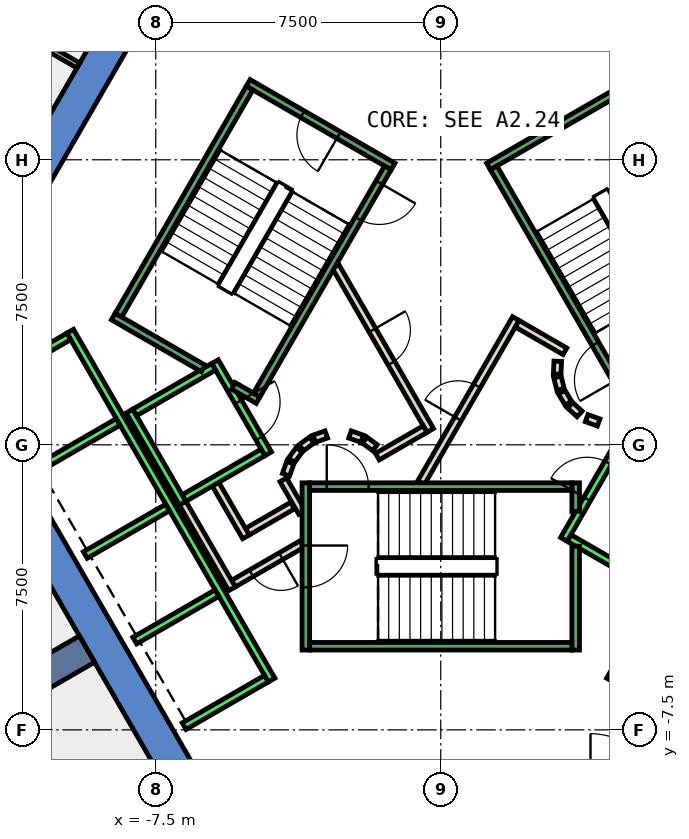
"""IFC4 building model, lengths in metres.
Left out: names, types, materials, properties, quantities, classifications, styles, units other than length and angle.
Written with IfcOpenShell. Run it as: python <this file> out.ifc"""

import sys

from ifc_helpers import new_model, si_unit, direction, frame, frame_2d, origin, place, context, subcontext, project, spatial, polyline, rectangle, outline, extrude, element, fill, save


model = new_model("IFC4")
c1 = context("Model", 3, precision=1e-05, world=origin(), true_north=direction((0.0, 1.0)))
c2 = subcontext(c1, "Body", "Model", "MODEL_VIEW")
j1 = project(units=[si_unit("LENGTHUNIT", "METRE"), si_unit("PLANEANGLEUNIT", "RADIAN")], contexts=[c1])
p1 = place(None, origin())
s1 = spatial("IfcSite", under=j1, at=p1, CompositionType="ELEMENT")
p2 = place(p1, origin())
s2 = spatial("IfcBuilding", under=s1, at=p2, CompositionType="ELEMENT")
p3 = place(p2, frame((0.0, 0.0, 116.0)))
s3 = spatial("IfcBuildingStorey", under=s2, at=p3, CompositionType="ELEMENT", Elevation=116.0)
p4 = place(p3, frame((0.0, 0.0, -0.4)))
e1 = element("IfcWall", 1, at=p4, inside=s3, PredefinedType="SHEAR", context=c2, shape_type="SweptSolid", body=[
    extrude(outline(polyline([(-12.267, 5.252), (-11.488, 4.802), (-6.409, 13.6), (-6.928, 14.5), (-12.267, 5.252)])), origin(), (0.0, 0.0, 1.0), 4.2),
])
p5 = place(p3, frame((0.0, 0.0, -0.4)))
e2 = element("IfcWall", 2, at=p5, inside=s3, PredefinedType="SHEAR", context=c2, shape_type="SweptSolid", body=[
    extrude(outline(polyline([(-13.856, 2.5), (-6.928, -9.5), (-6.409, -8.6), (-12.817, 2.5), (-13.856, 2.5)])), origin(), (0.0, 0.0, 1.0), 4.2),
])
p6 = place(p3, frame((-9.31, -5.375, -0.4), z_axis=(0.0, 0.0, 1.0), x_axis=(-0.866017533419, -0.500013631625, 0.0)))
e3 = element("IfcWall", 3, at=p6, inside=s3, PredefinedType="SHEAR", context=c2, shape_type="SweptSolid", body=[
    extrude(rectangle(XDim=9.0, YDim=0.8, at=frame_2d((4.5, 0.0))), origin(), (0.0, 0.0, 1.0), 4.2),
])
p7 = place(p3, frame((-3.9, -1.599, 0.0), z_axis=(0.0, 0.0, 1.0), x_axis=(-0.865969445389, -0.500096910261, 0.0)))
e4 = element("IfcWall", 4, at=p7, inside=s3, PredefinedType="PARTITIONING", context=c2, shape_type="SweptSolid", body=[
    extrude(rectangle(XDim=1.373, YDim=0.2, at=frame_2d((0.687, 0.0))), origin(), (0.0, 0.0, 1.0), 3.8),
])
p8 = place(p3, frame((-5.126, -2.422, 0.0), z_axis=(0.0, 0.0, 1.0), x_axis=(-0.500062241894, 0.865989465428, 0.0)))
e5 = element("IfcWall", 5, at=p8, inside=s3, PredefinedType="PARTITIONING", context=c2, shape_type="SweptSolid", body=[
    extrude(rectangle(XDim=1.7, YDim=0.2, at=frame_2d((0.85, 0.0))), origin(), (0.0, 0.0, 1.0), 3.8),
])
p9 = place(p3, frame((-3.65, -2.61, 0.0), z_axis=(0.0, 0.0, 1.0), x_axis=(-0.866072462134, -0.499918483688, 0.0)))
e6 = element("IfcWall", 6, at=p9, inside=s3, PredefinedType="PARTITIONING", context=c2, shape_type="SweptSolid", body=[
    extrude(rectangle(XDim=2.084, YDim=0.2, at=frame_2d((1.042, 0.0))), origin(), (0.0, 0.0, 1.0), 3.8),
])
p10 = place(p9, frame((0.642, 0.0, 0.0)))
e7 = element("IfcOpeningElement", 7, at=p10, cuts=e6, PredefinedType="OPENING", context=c2, shape_type="SweptSolid", body=[
    extrude(rectangle(XDim=0.9, YDim=2.1, at=frame_2d((0.45, 1.05))), frame((0.0, 0.11, 0.0), z_axis=(0.0, -1.0, 0.0), x_axis=(1.0, 0.0, 0.0)), (0.0, 0.0, 1.0), 0.22),
])
p11 = place(p3, frame((-5.492, -3.788, 0.0), z_axis=(0.0, 0.0, 1.0), x_axis=(-0.500008949224, 0.866020236886, 0.0)))
e8 = element("IfcWall", 8, at=p11, inside=s3, PredefinedType="PARTITIONING", context=c2, shape_type="SweptSolid", body=[
    extrude(rectangle(XDim=2.68, YDim=0.2, at=frame_2d((1.34, 0.0))), origin(), (0.0, 0.0, 1.0), 3.8),
])
p12 = place(p3, frame((-4.145, -0.92, 0.0), z_axis=(0.0, 0.0, 1.0), x_axis=(0.499743786207, -0.866173278362, 0.0)))
e9 = element("IfcWall", 9, at=p12, inside=s3, PredefinedType="PARTITIONING", context=c2, shape_type="SweptSolid", body=[
    extrude(rectangle(XDim=0.991, YDim=0.2, at=frame_2d((0.495, 0.0))), origin(), (0.0, 0.0, 1.0), 3.8),
])
p13 = place(p3, frame((-9.537, 9.981, 0.0), z_axis=(0.0, 0.0, 1.0), x_axis=(-0.866068787954, 0.499924848885, 0.0)))
e10 = element("IfcWall", 10, at=p13, inside=s3, PredefinedType="PARTITIONING", context=c2, shape_type="SweptSolid", body=[
    extrude(rectangle(XDim=3.829, YDim=0.15, at=frame_2d((1.914, 0.0))), origin(), (0.0, 0.0, 1.0), 3.8),
])
p14 = place(p3, frame((-0.52, -1.0, 0.0), z_axis=(0.0, 0.0, 1.0), x_axis=(0.50011622646, 0.865958290007, 0.0)))
e11 = element("IfcWall", 11, at=p14, inside=s3, PredefinedType="PARTITIONING", context=c2, shape_type="SweptSolid", body=[
    extrude(rectangle(XDim=4.991, YDim=0.2, at=frame_2d((2.496, 0.0))), origin(), (0.0, 0.0, 1.0), 3.8),
])
p15 = place(p14, frame((1.945, 0.0, 0.0)))
e12 = element("IfcOpeningElement", 12, at=p15, cuts=e11, PredefinedType="OPENING", context=c2, shape_type="SweptSolid", body=[
    extrude(rectangle(XDim=1.0, YDim=2.1, at=frame_2d((0.5, 1.05))), frame((0.0, 0.11, 0.0), z_axis=(0.0, -1.0, 0.0), x_axis=(1.0, 0.0, 0.0)), (0.0, 0.0, 1.0), 0.22),
])
p16 = place(p3, frame((2.012, 3.186, 0.0), z_axis=(0.0, 0.0, 1.0), x_axis=(0.865891012941, -0.500232699559, 0.0)))
e13 = element("IfcWall", 13, at=p16, inside=s3, PredefinedType="PARTITIONING", context=c2, shape_type="SweptSolid", body=[
    extrude(rectangle(XDim=1.449, YDim=0.2, at=frame_2d((0.725, 0.0))), origin(), (0.0, 0.0, 1.0), 3.8),
])
p17 = place(p3, frame((3.079, 2.199, 0.0), z_axis=(0.0, 0.0, 1.0), x_axis=(-0.047771483479, -0.998858290933, 0.0)))
e14 = element("IfcWall", 14, at=p17, inside=s3, PredefinedType="PARTITIONING", context=c2, shape_type="SweptSolid", body=[
    extrude(rectangle(XDim=0.337, YDim=0.2, at=frame_2d((0.169, 0.0))), origin(), (0.0, 0.0, 1.0), 3.8),
])
p18 = place(p3, frame((3.07, 1.786, 0.0), z_axis=(0.0, 0.0, 1.0), x_axis=(0.242705583207, -0.970099994784, 0.0)))
e15 = element("IfcWall", 15, at=p18, inside=s3, PredefinedType="PARTITIONING", context=c2, shape_type="SweptSolid", body=[
    extrude(rectangle(XDim=0.338, YDim=0.2, at=frame_2d((0.169, 0.0))), origin(), (0.0, 0.0, 1.0), 3.8),
])
for number, where, z_axis, x_axis in (
    (16, (3.182, 1.388, 0.0), (0.0, 0.0, 1.0), (0.512, -0.859, 0.0)),
    (17, (3.404, 1.039, 0.0), (0.0, 0.0, 1.0), (0.74, -0.672, 0.0)),
):
    element("IfcWall", number, at=place(p3, frame(where, z_axis=z_axis, x_axis=x_axis)), inside=s3, PredefinedType="PARTITIONING", context=c2, shape_type="SweptSolid", body=[
        extrude(rectangle(XDim=0.338, YDim=0.2, at=frame_2d((0.169, 0.0))), origin(), (0.0, 0.0, 1.0), 3.8),
    ])
p19 = place(p3, frame((3.838, 0.702, 0.0), z_axis=(0.0, 0.0, 1.0), x_axis=(0.941035081519, -0.338308993895, 0.0)))
e18 = element("IfcWall", 18, at=p19, inside=s3, PredefinedType="PARTITIONING", context=c2, shape_type="SweptSolid", body=[
    extrude(rectangle(XDim=0.337, YDim=0.2, at=frame_2d((0.168, 0.0))), origin(), (0.0, 0.0, 1.0), 3.8),
])
p20 = place(p3, frame((-2.771, 4.7, 0.0), z_axis=(0.0, 0.0, 1.0), x_axis=(0.499969479948, -0.866043023828, 0.0)))
e19 = element("IfcWall", 19, at=p20, inside=s3, PredefinedType="PARTITIONING", context=c2, shape_type="SweptSolid", body=[
    extrude(rectangle(XDim=4.99, YDim=0.2, at=frame_2d((2.495, 0.0))), origin(), (0.0, 0.0, 1.0), 3.8),
])
p21 = place(p20, frame((1.945, 0.0, 0.0)))
e20 = element("IfcOpeningElement", 20, at=p21, cuts=e19, PredefinedType="OPENING", context=c2, shape_type="SweptSolid", body=[
    extrude(rectangle(XDim=1.0, YDim=2.1, at=frame_2d((0.5, 1.05))), frame((0.0, 0.11, 0.0), z_axis=(0.0, -1.0, 0.0), x_axis=(1.0, 0.0, 0.0)), (0.0, 0.0, 1.0), 0.22),
])
p22 = place(p3, frame((-0.412, 0.414, 0.0), z_axis=(0.0, 0.0, 1.0), x_axis=(-0.866017369001, -0.500013916395, 0.0)))
e21 = element("IfcWall", 21, at=p22, inside=s3, PredefinedType="PARTITIONING", context=c2, shape_type="SweptSolid", body=[
    extrude(rectangle(XDim=1.45, YDim=0.2, at=frame_2d((0.725, 0.0))), origin(), (0.0, 0.0, 1.0), 3.8),
])
p23 = place(p3, frame((-1.731, -0.077, 0.0), z_axis=(0.0, 0.0, 1.0), x_axis=(-0.804311165252, 0.594208338422, 0.0)))
e22 = element("IfcWall", 22, at=p23, inside=s3, PredefinedType="PARTITIONING", context=c2, shape_type="SweptSolid", body=[
    extrude(rectangle(XDim=0.338, YDim=0.2, at=frame_2d((0.169, 0.0))), origin(), (0.0, 0.0, 1.0), 3.8),
])
p24 = place(p3, frame((-2.07, 0.16, 0.0), z_axis=(0.0, 0.0, 1.0), x_axis=(-0.942199461132, 0.335052496547, 0.0)))
e23 = element("IfcWall", 23, at=p24, inside=s3, PredefinedType="PARTITIONING", context=c2, shape_type="SweptSolid", body=[
    extrude(rectangle(XDim=0.337, YDim=0.2, at=frame_2d((0.169, 0.0))), origin(), (0.0, 0.0, 1.0), 3.8),
])
p25 = place(p3, frame((-3.012, 0.273, 0.0), z_axis=(0.0, 0.0, 1.0), x_axis=(-0.942280615813, -0.334824194261, 0.0)))
e24 = element("IfcWall", 24, at=p25, inside=s3, PredefinedType="PARTITIONING", context=c2, shape_type="SweptSolid", body=[
    extrude(rectangle(XDim=0.338, YDim=0.2, at=frame_2d((0.169, 0.0))), origin(), (0.0, 0.0, 1.0), 3.8),
])
p26 = place(p3, frame((-3.397, 0.124, 0.0), z_axis=(0.0, 0.0, 1.0), x_axis=(-0.804311165252, -0.594208338422, 0.0)))
e25 = element("IfcWall", 25, at=p26, inside=s3, PredefinedType="PARTITIONING", context=c2, shape_type="SweptSolid", body=[
    extrude(rectangle(XDim=0.338, YDim=0.2, at=frame_2d((0.169, 0.0))), origin(), (0.0, 0.0, 1.0), 3.8),
])
p27 = place(p3, frame((-3.723, -0.131, 0.0), z_axis=(0.0, 0.0, 1.0), x_axis=(-0.594675113454, -0.803966112121, 0.0)))
e26 = element("IfcWall", 26, at=p27, inside=s3, PredefinedType="PARTITIONING", context=c2, shape_type="SweptSolid", body=[
    extrude(rectangle(XDim=0.338, YDim=0.2, at=frame_2d((0.169, 0.0))), origin(), (0.0, 0.0, 1.0), 3.8),
])
p28 = place(p3, frame((-3.96, -0.47, 0.0), z_axis=(0.0, 0.0, 1.0), x_axis=(-0.334824194261, -0.942280615813, 0.0)))
e27 = element("IfcWall", 27, at=p28, inside=s3, PredefinedType="PARTITIONING", context=c2, shape_type="SweptSolid", body=[
    extrude(rectangle(XDim=0.338, YDim=0.2, at=frame_2d((0.169, 0.0))), origin(), (0.0, 0.0, 1.0), 3.8),
])
p29 = place(p3, frame((-5.94, 2.188, 0.0), z_axis=(0.0, 0.0, 1.0), x_axis=(0.49994636267, -0.866056369097, 0.0)))
e28 = element("IfcWall", 28, at=p29, inside=s3, PredefinedType="STANDARD", context=c2, shape_type="SweptSolid", body=[
    extrude(rectangle(XDim=2.8, YDim=0.2, at=frame_2d((1.4, 0.0))), origin(), (0.0, 0.0, 1.0), 3.8),
])
p30 = place(p29, frame((1.225, 0.0, 0.0)))
e29 = element("IfcOpeningElement", 29, at=p30, cuts=e28, PredefinedType="OPENING", context=c2, shape_type="SweptSolid", body=[
    extrude(rectangle(XDim=1.1, YDim=2.1, at=frame_2d((0.55, 1.05))), frame((0.0, 0.11, 0.0), z_axis=(0.0, -1.0, 0.0), x_axis=(1.0, 0.0, 0.0)), (0.0, 0.0, 1.0), 0.22),
])
p31 = place(p3, frame((-8.192, 0.888, 0.0), z_axis=(0.0, 0.0, 1.0), x_axis=(0.49994636267, -0.866056369097, 0.0)))
e30 = element("IfcWall", 30, at=p31, inside=s3, PredefinedType="STANDARD", context=c2, shape_type="SweptSolid", body=[
    extrude(rectangle(XDim=2.8, YDim=0.2, at=frame_2d((1.4, 0.0))), origin(), (0.0, 0.0, 1.0), 3.8),
])
for number, where, z_axis, x_axis in (
    (31, (-5.977, 2.052, 0.0), (0.0, 0.0, 1.0), (-0.866, -0.5, 0.0)),
    (32, (-4.677, -0.2, 0.0), (0.0, 0.0, 1.0), (-0.866, -0.5, 0.0)),
):
    element("IfcWall", number, at=place(p3, frame(where, z_axis=z_axis, x_axis=x_axis)), inside=s3, PredefinedType="STANDARD", context=c2, shape_type="SweptSolid", body=[
        extrude(rectangle(XDim=2.399, YDim=0.2, at=frame_2d((1.2, 0.0))), origin(), (0.0, 0.0, 1.0), 3.8),
    ])
p32 = place(p3, frame((-9.751, 2.99, 0.0), z_axis=(0.0, 0.0, 1.0), x_axis=(0.50000090737, -0.866024879913, 0.0)))
e33 = element("IfcWall", 33, at=p32, inside=s3, PredefinedType="STANDARD", context=c2, shape_type="SweptSolid", body=[
    extrude(rectangle(XDim=10.6, YDim=0.2, at=frame_2d((5.3, 0.0))), origin(), (0.0, 0.0, 1.0), 3.8),
])
p33 = place(p3, frame((-9.788, 2.853, 0.0), z_axis=(0.0, 0.0, 1.0), x_axis=(-0.865998541277, -0.500046524342, 0.0)))
e34 = element("IfcWall", 34, at=p33, inside=s3, PredefinedType="STANDARD", context=c2, shape_type="SweptSolid", body=[
    extrude(rectangle(XDim=2.5, YDim=0.2, at=frame_2d((1.25, 0.0))), origin(), (0.0, 0.0, 1.0), 3.8),
])
for number, where, z_axis, x_axis in (
    (35, (-8.488, 0.602, 0.0), (0.0, 0.0, 1.0), (-0.866, -0.5, 0.0)),
    (36, (-7.188, -1.65, 0.0), (0.0, 0.0, 1.0), (-0.866, -0.5, 0.0)),
    (37, (-5.888, -3.902, 0.0), (0.0, 0.0, 1.0), (-0.866, -0.5, 0.0)),
    (38, (-4.588, -6.153, 0.0), (0.0, 0.0, 1.0), (-0.866, -0.5, 0.0)),
):
    element("IfcWall", number, at=place(p3, frame(where, z_axis=z_axis, x_axis=x_axis)), inside=s3, PredefinedType="STANDARD", context=c2, shape_type="SweptSolid", body=[
        extrude(rectangle(XDim=2.5, YDim=0.2, at=frame_2d((1.25, 0.0))), origin(), (0.0, 0.0, 1.0), 3.8),
    ])
p34 = place(p3, frame((3.24, -2.488, 0.0), z_axis=(0.0, 0.0, 1.0), x_axis=(0.49994636267, 0.866056369097, 0.0)))
e39 = element("IfcWall", 39, at=p34, inside=s3, PredefinedType="STANDARD", context=c2, shape_type="SweptSolid", body=[
    extrude(rectangle(XDim=2.8, YDim=0.2, at=frame_2d((1.4, 0.0))), origin(), (0.0, 0.0, 1.0), 3.8),
])
p35 = place(p34, frame((1.225, 0.0, 0.0)))
e40 = element("IfcOpeningElement", 40, at=p35, cuts=e39, PredefinedType="OPENING", context=c2, shape_type="SweptSolid", body=[
    extrude(rectangle(XDim=1.1, YDim=2.1, at=frame_2d((0.55, 1.05))), frame((0.0, 0.11, 0.0), z_axis=(0.0, -1.0, 0.0), x_axis=(1.0, 0.0, 0.0)), (0.0, 0.0, 1.0), 0.22),
])
p36 = place(p3, frame((3.377, -2.452, 0.0), z_axis=(0.0, 0.0, 1.0), x_axis=(0.865955154139, -0.50012165622, 0.0)))
e41 = element("IfcWall", 41, at=p36, inside=s3, PredefinedType="STANDARD", context=c2, shape_type="SweptSolid", body=[
    extrude(rectangle(XDim=2.4, YDim=0.2, at=frame_2d((1.2, 0.0))), origin(), (0.0, 0.0, 1.0), 3.8),
])
p37 = place(p3, frame((4.451, -6.19, 0.0), z_axis=(0.0, 0.0, 1.0), x_axis=(0.50000090737, 0.866024879913, 0.0)))
e42 = element("IfcWall", 42, at=p37, inside=s3, PredefinedType="STANDARD", context=c2, shape_type="SweptSolid", body=[
    extrude(rectangle(XDim=10.6, YDim=0.2, at=frame_2d((5.3, 0.0))), origin(), (0.0, 0.0, 1.0), 3.8),
])
p38 = place(p3, frame((-3.55, -1.0, 0.0), z_axis=(0.0, 0.0, 1.0), x_axis=(0.0, -1.0, 0.0)))
e43 = element("IfcWall", 43, at=p38, inside=s3, PredefinedType="STANDARD", context=c2, shape_type="SweptSolid", body=[
    extrude(rectangle(XDim=4.4, YDim=0.2, at=frame_2d((2.2, 0.0))), origin(), (0.0, 0.0, 1.0), 3.8),
])
p39 = place(p38, frame((1.65, 0.0, 0.0)))
e44 = element("IfcOpeningElement", 44, at=p39, cuts=e43, PredefinedType="OPENING", context=c2, shape_type="SweptSolid", body=[
    extrude(rectangle(XDim=1.1, YDim=2.2, at=frame_2d((0.55, 1.1))), frame((0.0, 0.11, 0.0), z_axis=(0.0, -1.0, 0.0), x_axis=(1.0, 0.0, 0.0)), (0.0, 0.0, 1.0), 0.22),
])
p40 = place(p3, frame((3.55, -2.667, 0.0), z_axis=(0.0, 0.0, 1.0), x_axis=(0.0, -1.0, 0.0)))
e45 = element("IfcWall", 45, at=p40, inside=s3, PredefinedType="STANDARD", context=c2, shape_type="SweptSolid", body=[
    extrude(rectangle(XDim=2.733, YDim=0.2, at=frame_2d((1.366, 0.0))), origin(), (0.0, 0.0, 1.0), 3.8),
])
p41 = place(p3, frame((3.55, -1.0, 0.0), z_axis=(0.0, 0.0, 1.0), x_axis=(0.0, -1.0, 0.0)))
e46 = element("IfcWall", 46, at=p41, inside=s3, PredefinedType="STANDARD", context=c2, shape_type="SweptSolid", body=[
    extrude(rectangle(XDim=0.751, YDim=0.2, at=frame_2d((0.375, 0.0))), origin(), (0.0, 0.0, 1.0), 3.8),
])
p42 = place(p3, frame((-3.45, -1.1, 0.0), z_axis=(0.0, 0.0, 1.0), x_axis=(1.0, 0.0, 0.0)))
e47 = element("IfcWall", 47, at=p42, inside=s3, PredefinedType="STANDARD", context=c2, shape_type="SweptSolid", body=[
    extrude(rectangle(XDim=6.9, YDim=0.2, at=frame_2d((3.45, 0.0))), origin(), (0.0, 0.0, 1.0), 3.8),
])
p43 = place(p42, frame((0.45, 0.0, 0.0)))
e48 = element("IfcOpeningElement", 48, at=p43, cuts=e47, PredefinedType="OPENING", context=c2, shape_type="SweptSolid", body=[
    extrude(rectangle(XDim=1.1, YDim=2.2, at=frame_2d((0.55, 1.1))), frame((0.0, 0.11, 0.0), z_axis=(0.0, -1.0, 0.0), x_axis=(1.0, 0.0, 0.0)), (0.0, 0.0, 1.0), 0.22),
])
p44 = place(p3, frame((-3.45, -5.3, 0.0), z_axis=(0.0, 0.0, 1.0), x_axis=(1.0, 0.0, 0.0)))
e49 = element("IfcWall", 49, at=p44, inside=s3, PredefinedType="STANDARD", context=c2, shape_type="SweptSolid", body=[
    extrude(rectangle(XDim=6.9, YDim=0.2, at=frame_2d((3.45, 0.0))), origin(), (0.0, 0.0, 1.0), 3.8),
])
p45 = place(p3, frame((1.256, 7.324, 0.0), z_axis=(0.0, 0.0, 1.0), x_axis=(0.866046073146, 0.499964197906, 0.0)))
e50 = element("IfcWall", 50, at=p45, inside=s3, PredefinedType="STANDARD", context=c2, shape_type="SweptSolid", body=[
    extrude(rectangle(XDim=4.4, YDim=0.2, at=frame_2d((2.2, 0.0))), origin(), (0.0, 0.0, 1.0), 3.8),
])
p46 = place(p3, frame((4.843, 1.312, 0.0), z_axis=(0.0, 0.0, 1.0), x_axis=(-0.499963383562, 0.866046543262, 0.0)))
e51 = element("IfcWall", 51, at=p46, inside=s3, PredefinedType="STANDARD", context=c2, shape_type="SweptSolid", body=[
    extrude(rectangle(XDim=6.9, YDim=0.2, at=frame_2d((3.45, 0.0))), origin(), (0.0, 0.0, 1.0), 3.8),
])
p47 = place(p46, frame((0.45, 0.0, 0.0)))
e52 = element("IfcOpeningElement", 52, at=p47, cuts=e51, PredefinedType="OPENING", context=c2, shape_type="SweptSolid", body=[
    extrude(rectangle(XDim=1.1, YDim=2.2, at=frame_2d((0.55, 1.1))), frame((0.0, 0.11, 0.0), z_axis=(0.0, -1.0, 0.0), x_axis=(1.0, 0.0, 0.0)), (0.0, 0.0, 1.0), 0.22),
])
p48 = place(p3, frame((-1.256, 7.324, 0.0), z_axis=(0.0, 0.0, 1.0), x_axis=(-0.866046073146, 0.499964197906, 0.0)))
e53 = element("IfcWall", 53, at=p48, inside=s3, PredefinedType="STANDARD", context=c2, shape_type="SweptSolid", body=[
    extrude(rectangle(XDim=4.4, YDim=0.2, at=frame_2d((2.2, 0.0))), origin(), (0.0, 0.0, 1.0), 3.8),
])
p49 = place(p48, frame((1.65, 0.0, 0.0)))
e54 = element("IfcOpeningElement", 54, at=p49, cuts=e53, PredefinedType="OPENING", context=c2, shape_type="SweptSolid", body=[
    extrude(rectangle(XDim=1.1, YDim=2.2, at=frame_2d((0.55, 1.1))), frame((0.0, 0.11, 0.0), z_axis=(0.0, -1.0, 0.0), x_axis=(1.0, 0.0, 0.0)), (0.0, 0.0, 1.0), 0.22),
])
p50 = place(p3, frame((-6.25, 2.01, 0.0), z_axis=(0.0, 0.0, 1.0), x_axis=(-0.86611865017, 0.499838457731, 0.0)))
e55 = element("IfcWall", 55, at=p50, inside=s3, PredefinedType="STANDARD", context=c2, shape_type="SweptSolid", body=[
    extrude(rectangle(XDim=2.733, YDim=0.2, at=frame_2d((1.366, 0.0))), origin(), (0.0, 0.0, 1.0), 3.8),
])
p51 = place(p3, frame((-4.806, 1.176, 0.0), z_axis=(0.0, 0.0, 1.0), x_axis=(-0.866558586415, 0.499075361355, 0.0)))
e56 = element("IfcWall", 56, at=p51, inside=s3, PredefinedType="STANDARD", context=c2, shape_type="SweptSolid", body=[
    extrude(rectangle(XDim=0.751, YDim=0.2, at=frame_2d((0.376, 0.0))), origin(), (0.0, 0.0, 1.0), 3.8),
])
p52 = place(p3, frame((-1.393, 7.288, 0.0), z_axis=(0.0, 0.0, 1.0), x_axis=(-0.499963383562, -0.866046543262, 0.0)))
e57 = element("IfcWall", 57, at=p52, inside=s3, PredefinedType="STANDARD", context=c2, shape_type="SweptSolid", body=[
    extrude(rectangle(XDim=6.9, YDim=0.2, at=frame_2d((3.45, 0.0))), origin(), (0.0, 0.0, 1.0), 3.8),
])
p53 = place(p52, frame((0.45, 0.0, 0.0)))
e58 = element("IfcOpeningElement", 58, at=p53, cuts=e57, PredefinedType="OPENING", context=c2, shape_type="SweptSolid", body=[
    extrude(rectangle(XDim=1.1, YDim=2.2, at=frame_2d((0.55, 1.1))), frame((0.0, 0.11, 0.0), z_axis=(0.0, -1.0, 0.0), x_axis=(1.0, 0.0, 0.0)), (0.0, 0.0, 1.0), 0.22),
])
p54 = place(p3, frame((-5.03, 9.388, 0.0), z_axis=(0.0, 0.0, 1.0), x_axis=(-0.499978703459, -0.866037698999, 0.0)))
e59 = element("IfcWall", 59, at=p54, inside=s3, PredefinedType="STANDARD", context=c2, shape_type="SweptSolid", body=[
    extrude(rectangle(XDim=6.9, YDim=0.2, at=frame_2d((3.45, 0.0))), origin(), (0.0, 0.0, 1.0), 3.8),
])
p55 = place(p15, origin())
e60 = element("IfcDoor", 60, at=p55, inside=s3, OperationType="SINGLE_SWING_LEFT", PredefinedType="DOOR", context=c2, shape_type="SweptSolid", body=[
    extrude(rectangle(XDim=1.0, YDim=2.1, at=frame_2d((0.5, 1.05))), frame((0.0, 0.025, 0.0), z_axis=(0.0, -1.0, 0.0), x_axis=(1.0, 0.0, 0.0)), (0.0, 0.0, 1.0), 0.05),
])
fill(e12, e60)
p56 = place(p21, origin())
e61 = element("IfcDoor", 61, at=p56, inside=s3, OperationType="SINGLE_SWING_RIGHT", PredefinedType="DOOR", context=c2, shape_type="SweptSolid", body=[
    extrude(rectangle(XDim=1.0, YDim=2.1, at=frame_2d((0.5, 1.05))), frame((0.0, 0.025, 0.0), z_axis=(0.0, -1.0, 0.0), x_axis=(1.0, 0.0, 0.0)), (0.0, 0.0, 1.0), 0.05),
])
fill(e20, e61)
p57 = place(p10, origin())
e62 = element("IfcDoor", 62, at=p57, inside=s3, OperationType="SINGLE_SWING_LEFT", PredefinedType="DOOR", context=c2, shape_type="SweptSolid", body=[
    extrude(rectangle(XDim=0.9, YDim=2.1, at=frame_2d((0.45, 1.05))), frame((0.0, 0.025, 0.0), z_axis=(0.0, -1.0, 0.0), x_axis=(1.0, 0.0, 0.0)), (0.0, 0.0, 1.0), 0.05),
])
fill(e7, e62)
p58 = place(p35, origin())
e63 = element("IfcDoor", 63, at=p58, inside=s3, OperationType="SLIDING_TO_LEFT", PredefinedType="DOOR", context=c2, shape_type="SweptSolid", body=[
    extrude(rectangle(XDim=1.1, YDim=2.1, at=frame_2d((0.55, 1.05))), frame((0.0, 0.025, 0.0), z_axis=(0.0, -1.0, 0.0), x_axis=(1.0, 0.0, 0.0)), (0.0, 0.0, 1.0), 0.05),
])
fill(e40, e63)
p59 = place(p30, origin())
e64 = element("IfcDoor", 64, at=p59, inside=s3, OperationType="SLIDING_TO_LEFT", PredefinedType="DOOR", context=c2, shape_type="SweptSolid", body=[
    extrude(rectangle(XDim=1.1, YDim=2.1, at=frame_2d((0.55, 1.05))), frame((0.0, 0.025, 0.0), z_axis=(0.0, -1.0, 0.0), x_axis=(1.0, 0.0, 0.0)), (0.0, 0.0, 1.0), 0.05),
])
fill(e29, e64)
p60 = place(p43, origin())
e65 = element("IfcDoor", 65, at=p60, inside=s3, OperationType="SINGLE_SWING_LEFT", PredefinedType="DOOR", context=c2, shape_type="SweptSolid", body=[
    extrude(rectangle(XDim=1.1, YDim=2.2, at=frame_2d((0.55, 1.1))), frame((0.0, 0.025, 0.0), z_axis=(0.0, -1.0, 0.0), x_axis=(1.0, 0.0, 0.0)), (0.0, 0.0, 1.0), 0.05),
])
fill(e48, e65)
p61 = place(p39, origin())
e66 = element("IfcDoor", 66, at=p61, inside=s3, OperationType="SINGLE_SWING_LEFT", PredefinedType="DOOR", context=c2, shape_type="SweptSolid", body=[
    extrude(rectangle(XDim=1.1, YDim=2.2, at=frame_2d((0.55, 1.1))), frame((0.0, 0.025, 0.0), z_axis=(0.0, -1.0, 0.0), x_axis=(1.0, 0.0, 0.0)), (0.0, 0.0, 1.0), 0.05),
])
fill(e44, e66)
p62 = place(p47, origin())
e67 = element("IfcDoor", 67, at=p62, inside=s3, OperationType="SINGLE_SWING_LEFT", PredefinedType="DOOR", context=c2, shape_type="SweptSolid", body=[
    extrude(rectangle(XDim=1.1, YDim=2.2, at=frame_2d((0.55, 1.1))), frame((0.0, 0.025, 0.0), z_axis=(0.0, -1.0, 0.0), x_axis=(1.0, 0.0, 0.0)), (0.0, 0.0, 1.0), 0.05),
])
fill(e52, e67)
p63 = place(p53, origin())
e68 = element("IfcDoor", 68, at=p63, inside=s3, OperationType="SINGLE_SWING_LEFT", PredefinedType="DOOR", context=c2, shape_type="SweptSolid", body=[
    extrude(rectangle(XDim=1.1, YDim=2.2, at=frame_2d((0.55, 1.1))), frame((0.0, 0.025, 0.0), z_axis=(0.0, -1.0, 0.0), x_axis=(1.0, 0.0, 0.0)), (0.0, 0.0, 1.0), 0.05),
])
fill(e58, e68)
p64 = place(p49, origin())
e69 = element("IfcDoor", 69, at=p64, inside=s3, OperationType="SINGLE_SWING_LEFT", PredefinedType="DOOR", context=c2, shape_type="SweptSolid", body=[
    extrude(rectangle(XDim=1.1, YDim=2.2, at=frame_2d((0.55, 1.1))), frame((0.0, 0.025, 0.0), z_axis=(0.0, -1.0, 0.0), x_axis=(1.0, 0.0, 0.0)), (0.0, 0.0, 1.0), 0.05),
])
fill(e54, e69)
save(model, sys.argv[1])
